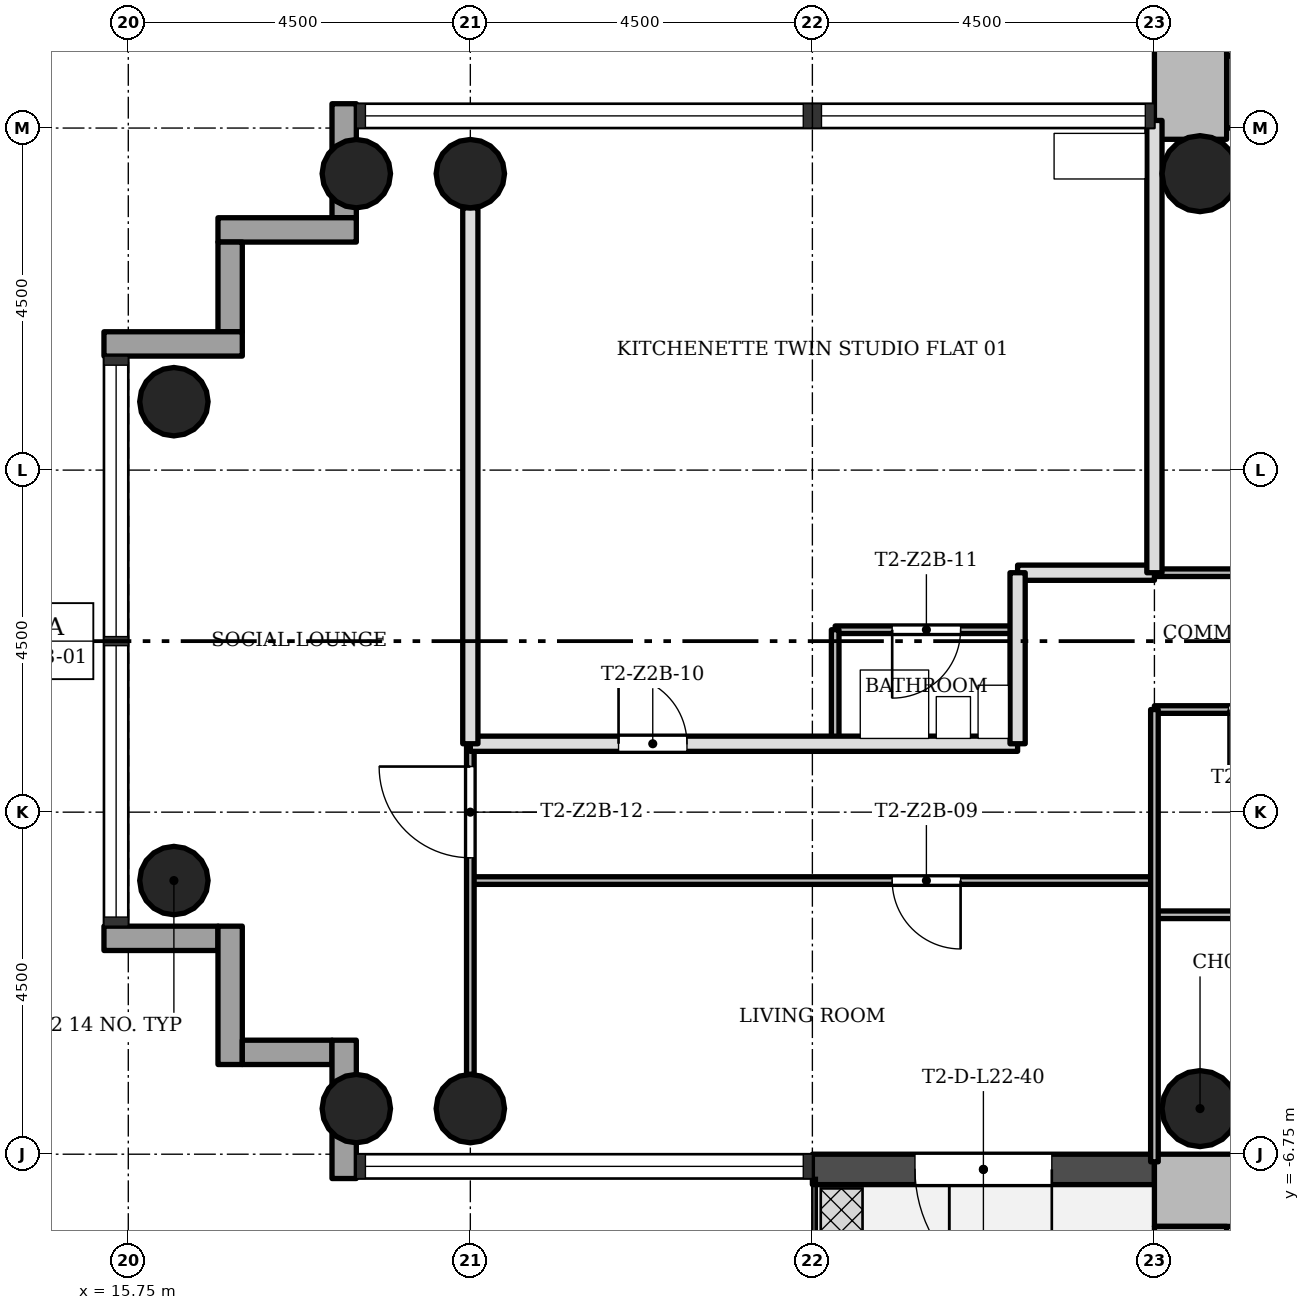
"""IFC4 building model, lengths in metres.
Left out: names, types, materials, properties, quantities, classifications, styles, units other than length and angle.
Written with IfcOpenShell. Run it as: python <this file> out.ifc"""

import sys

from ifc_helpers import new_model, si_unit, direction, frame, frame_2d, origin, origin_2d, place, context, subcontext, project, spatial, rectangle, hollow_circle, extrude, element, fill, save


model = new_model("IFC4")
c1 = context("Model", 3, precision=1e-05, world=origin(), true_north=direction((0.0, 1.0)))
c2 = subcontext(c1, "Body", "Model", "MODEL_VIEW")
j1 = project(units=[si_unit("LENGTHUNIT", "METRE"), si_unit("PLANEANGLEUNIT", "RADIAN")], contexts=[c1])
p1 = place(None, origin())
s1 = spatial("IfcSite", under=j1, at=p1, CompositionType="ELEMENT")
p2 = place(p1, origin())
s2 = spatial("IfcBuilding", under=s1, at=p2, CompositionType="ELEMENT")
p3 = place(p2, frame((0.0, 0.0, 83.4)))
s3 = spatial("IfcBuildingStorey", under=s2, at=p3, CompositionType="ELEMENT", Elevation=83.4)
p4 = place(p3, frame((30.2, 7.225, 0.0), z_axis=(0.0, 0.0, 1.0), x_axis=(1.0, 0.0, 0.0)))
e1 = element("IfcWall", 1, at=p4, inside=s3, PredefinedType="SHEAR", context=c2, shape_type="SweptSolid", body=[
    extrude(rectangle(XDim=12.55, YDim=0.95, at=frame_2d((6.275, 0.0))), origin(), (0.0, 0.0, 1.0), 3.4),
])
p5 = place(p4, frame((4.9, 0.0, 0.0)))
e2 = element("IfcOpeningElement", 2, at=p5, cuts=e1, PredefinedType="OPENING", context=c2, shape_type="SweptSolid", body=[
    extrude(rectangle(XDim=1.8, YDim=2.1, at=frame_2d((0.9, 1.05))), frame((0.0, 0.485, 0.0), z_axis=(0.0, -1.0, 0.0), x_axis=(1.0, 0.0, 0.0)), (0.0, 0.0, 1.0), 0.97),
])
p6 = place(p3, frame((29.725, 15.298, 0.0), z_axis=(0.0, 0.0, 1.0), x_axis=(0.0, -1.0, 0.0)))
e3 = element("IfcWall", 3, at=p6, inside=s3, PredefinedType="SHEAR", context=c2, shape_type="SweptSolid", body=[
    extrude(rectangle(XDim=8.696, YDim=0.95, at=frame_2d((4.348, 0.0))), origin(), (0.0, 0.0, 1.0), 3.4),
])
p7 = place(p3, frame((41.8, -7.225, 0.0), z_axis=(0.0, 0.0, 1.0), x_axis=(-1.0, 0.0, 0.0)))
e4 = element("IfcWall", 4, at=p7, inside=s3, PredefinedType="SHEAR", context=c2, shape_type="SweptSolid", body=[
    extrude(rectangle(XDim=12.55, YDim=0.95, at=frame_2d((6.275, 0.0))), origin(), (0.0, 0.0, 1.0), 3.4),
])
p8 = place(p7, frame((4.9, 0.0, 0.0)))
e5 = element("IfcOpeningElement", 5, at=p8, cuts=e4, PredefinedType="OPENING", context=c2, shape_type="SweptSolid", body=[
    extrude(rectangle(XDim=1.8, YDim=2.1, at=frame_2d((0.9, 1.05))), frame((0.0, 0.485, 0.0), z_axis=(0.0, -1.0, 0.0), x_axis=(1.0, 0.0, 0.0)), (0.0, 0.0, 1.0), 0.97),
])
p9 = place(p3, frame((29.725, -7.7, 0.0), z_axis=(0.0, 0.0, 1.0), x_axis=(0.0, -1.0, 0.0)))
e6 = element("IfcWall", 6, at=p9, inside=s3, PredefinedType="SHEAR", context=c2, shape_type="SweptSolid", body=[
    extrude(rectangle(XDim=8.05, YDim=0.95, at=frame_2d((4.025, 0.0))), origin(), (0.0, 0.0, 1.0), 3.4),
])
for number, where, z_axis, x_axis in (
    (7, (20.25, 6.15, 0.0), (0.0, 0.0, 1.0), (1.0, 0.0, 0.0)),
    (8, (20.25, -6.15, 0.0), (0.0, 0.0, 1.0), (1.0, 0.0, 0.0)),
    (9, (18.75, 6.15, 0.0), (0.0, 0.0, 1.0), (1.0, 0.0, 0.0)),
    (10, (18.75, -6.15, 0.0), (0.0, 0.0, 1.0), (1.0, 0.0, 0.0)),
    (11, (16.35, 3.15, 0.0), (0.0, 0.0, 1.0), (1.0, 0.0, 0.0)),
    (12, (16.35, -3.15, 0.0), (0.0, 0.0, 1.0), (1.0, 0.0, 0.0)),
):
    element("IfcColumn", number, at=place(p3, frame(where, z_axis=z_axis, x_axis=x_axis)), inside=s3, PredefinedType="COLUMN", context=c2, shape_type="SweptSolid", body=[
        extrude(hollow_circle(Radius=0.45, WallThickness=0.032, at=origin_2d()), origin(), (0.0, 0.0, 1.0), 3.4),
    ])
for number, where, z_axis, x_axis in (
    (13, (29.85, 6.15, 0.0), (0.0, 0.0, 1.0), (1.0, 0.0, 0.0)),
    (14, (29.85, -6.15, 0.0), (0.0, 0.0, 1.0), (1.0, 0.0, 0.0)),
):
    element("IfcColumn", number, at=place(p3, frame(where, z_axis=z_axis, x_axis=x_axis)), inside=s3, PredefinedType="COLUMN", context=c2, shape_type="SweptSolid", body=[
        extrude(hollow_circle(Radius=0.5, WallThickness=0.036, at=origin_2d()), origin(), (0.0, 0.0, 1.0), 3.4),
    ])
p10 = place(p3, frame((18.59, 7.07, -0.3), z_axis=(0.0, 0.0, 1.0), x_axis=(0.0, -1.0, 0.0)))
e15 = element("IfcWall", 15, at=p10, inside=s3, PredefinedType="STANDARD", context=c2, shape_type="SweptSolid", body=[
    extrude(rectangle(XDim=1.5, YDim=0.32, at=frame_2d((0.75, 0.0))), origin(), (0.0, 0.0, 1.0), 3.4),
])
p11 = place(p3, frame((18.75, 5.41, -0.3), z_axis=(0.0, 0.0, 1.0), x_axis=(-1.0, 0.0, 0.0)))
e16 = element("IfcWall", 16, at=p11, inside=s3, PredefinedType="STANDARD", context=c2, shape_type="SweptSolid", body=[
    extrude(rectangle(XDim=1.82, YDim=0.32, at=frame_2d((0.91, 0.0))), origin(), (0.0, 0.0, 1.0), 3.4),
])
p12 = place(p3, frame((17.09, 5.25, -0.3), z_axis=(0.0, 0.0, 1.0), x_axis=(0.0, -1.0, 0.0)))
e17 = element("IfcWall", 17, at=p12, inside=s3, PredefinedType="STANDARD", context=c2, shape_type="SweptSolid", body=[
    extrude(rectangle(XDim=1.18, YDim=0.32, at=frame_2d((0.59, 0.0))), origin(), (0.0, 0.0, 1.0), 3.4),
])
p13 = place(p3, frame((17.25, 3.91, -0.3), z_axis=(0.0, 0.0, 1.0), x_axis=(-1.0, 0.0, 0.0)))
e18 = element("IfcWall", 18, at=p13, inside=s3, PredefinedType="STANDARD", context=c2, shape_type="SweptSolid", body=[
    extrude(rectangle(XDim=1.82, YDim=0.32, at=frame_2d((0.91, 0.0))), origin(), (0.0, 0.0, 1.0), 3.4),
])
p14 = place(p3, frame((15.43, -3.91, -0.3), z_axis=(0.0, 0.0, 1.0), x_axis=(1.0, 0.0, 0.0)))
e19 = element("IfcWall", 19, at=p14, inside=s3, PredefinedType="STANDARD", context=c2, shape_type="SweptSolid", body=[
    extrude(rectangle(XDim=1.5, YDim=0.32, at=frame_2d((0.75, 0.0))), origin(), (0.0, 0.0, 1.0), 3.4),
])
p15 = place(p3, frame((17.09, -3.75, -0.3), z_axis=(0.0, 0.0, 1.0), x_axis=(0.0, -1.0, 0.0)))
e20 = element("IfcWall", 20, at=p15, inside=s3, PredefinedType="STANDARD", context=c2, shape_type="SweptSolid", body=[
    extrude(rectangle(XDim=1.82, YDim=0.32, at=frame_2d((0.91, 0.0))), origin(), (0.0, 0.0, 1.0), 3.4),
])
p16 = place(p3, frame((17.25, -5.41, -0.3), z_axis=(0.0, 0.0, 1.0), x_axis=(1.0, 0.0, 0.0)))
e21 = element("IfcWall", 21, at=p16, inside=s3, PredefinedType="STANDARD", context=c2, shape_type="SweptSolid", body=[
    extrude(rectangle(XDim=1.18, YDim=0.32, at=frame_2d((0.59, 0.0))), origin(), (0.0, 0.0, 1.0), 3.4),
])
p17 = place(p3, frame((18.59, -5.25, -0.3), z_axis=(0.0, 0.0, 1.0), x_axis=(0.0, -1.0, 0.0)))
e22 = element("IfcWall", 22, at=p17, inside=s3, PredefinedType="STANDARD", context=c2, shape_type="SweptSolid", body=[
    extrude(rectangle(XDim=1.82, YDim=0.32, at=frame_2d((0.91, 0.0))), origin(), (0.0, 0.0, 1.0), 3.4),
])
p18 = place(p3, frame((24.75, -6.95, -0.02), z_axis=(0.0, 0.0, 1.0), x_axis=(1.0, 0.0, 0.0)))
e23 = element("IfcWall", 23, at=p18, inside=s3, PredefinedType="STANDARD", context=c2, shape_type="SweptSolid", body=[
    extrude(rectangle(XDim=4.5, YDim=0.4, at=frame_2d((2.25, 0.0))), origin(), (0.0, 0.0, 1.0), 3.12),
])
p19 = place(p18, frame((1.35, 0.0, 0.02)))
e24 = element("IfcOpeningElement", 24, at=p19, cuts=e23, PredefinedType="OPENING", context=c2, shape_type="SweptSolid", body=[
    extrude(rectangle(XDim=1.8, YDim=2.1, at=frame_2d((0.9, 1.05))), frame((0.0, 0.21, 0.0), z_axis=(0.0, -1.0, 0.0), x_axis=(1.0, 0.0, 0.0)), (0.0, 0.0, 1.0), 0.42),
])
p20 = place(p3, frame((34.5, -3.6, 0.0), z_axis=(0.0, 0.0, 1.0), x_axis=(-1.0, 0.0, 0.0)))
e25 = element("IfcWall", 25, at=p20, inside=s3, PredefinedType="PARTITIONING", context=c2, shape_type="SweptSolid", body=[
    extrude(rectangle(XDim=5.25, YDim=0.1, at=frame_2d((2.625, 0.0))), origin(), (0.0, 0.0, 1.0), 3.0),
])
p21 = place(p3, frame((29.25, -3.15, 0.0), z_axis=(0.0, 0.0, 1.0), x_axis=(-1.0, 0.0, 0.0)))
e26 = element("IfcWall", 26, at=p21, inside=s3, PredefinedType="PARTITIONING", context=c2, shape_type="SweptSolid", body=[
    extrude(rectangle(XDim=9.0, YDim=0.1, at=frame_2d((4.5, 0.0))), origin(), (0.0, 0.0, 1.0), 3.0),
])
p22 = place(p21, frame((2.55, 0.0, 0.0)))
e27 = element("IfcOpeningElement", 27, at=p22, cuts=e26, PredefinedType="OPENING", context=c2, shape_type="SweptSolid", body=[
    extrude(rectangle(XDim=0.9, YDim=2.1, at=frame_2d((0.45, 1.05))), frame((0.0, 0.06, 0.0), z_axis=(0.0, -1.0, 0.0), x_axis=(1.0, 0.0, 0.0)), (0.0, 0.0, 1.0), 0.12),
])
p23 = place(p3, frame((27.45, -1.35, 0.0), z_axis=(0.0, 0.0, 1.0), x_axis=(-1.0, 0.0, 0.0)))
e28 = element("IfcWall", 28, at=p23, inside=s3, PredefinedType="SOLIDWALL", context=c2, shape_type="SweptSolid", body=[
    extrude(rectangle(XDim=7.2, YDim=0.2, at=frame_2d((3.6, 0.0))), origin(), (0.0, 0.0, 1.0), 3.0),
])
p24 = place(p23, frame((4.35, 0.0, 0.0)))
e29 = element("IfcOpeningElement", 29, at=p24, cuts=e28, PredefinedType="OPENING", context=c2, shape_type="SweptSolid", body=[
    extrude(rectangle(XDim=0.9, YDim=2.1, at=frame_2d((0.45, 1.05))), frame((0.0, 0.11, 0.0), z_axis=(0.0, -1.0, 0.0), x_axis=(1.0, 0.0, 0.0)), (0.0, 0.0, 1.0), 0.22),
])
p25 = place(p3, frame((34.5, -0.9, 0.0), z_axis=(0.0, 0.0, 1.0), x_axis=(-1.0, 0.0, 0.0)))
e30 = element("IfcWall", 30, at=p25, inside=s3, PredefinedType="PARTITIONING", context=c2, shape_type="SweptSolid", body=[
    extrude(rectangle(XDim=5.25, YDim=0.1, at=frame_2d((2.625, 0.0))), origin(), (0.0, 0.0, 1.0), 3.0),
])
p26 = place(p25, frame((0.75, 0.0, 0.0)))
e31 = element("IfcOpeningElement", 31, at=p26, cuts=e30, PredefinedType="OPENING", context=c2, shape_type="SweptSolid", body=[
    extrude(rectangle(XDim=0.9, YDim=2.1, at=frame_2d((0.45, 1.05))), frame((0.0, 0.06, 0.0), z_axis=(0.0, -1.0, 0.0), x_axis=(1.0, 0.0, 0.0)), (0.0, 0.0, 1.0), 0.12),
])
p27 = place(p25, frame((3.375, 0.0, 0.0)))
e32 = element("IfcOpeningElement", 32, at=p27, cuts=e30, PredefinedType="OPENING", context=c2, shape_type="SweptSolid", body=[
    extrude(rectangle(XDim=0.9, YDim=2.1, at=frame_2d((0.45, 1.05))), frame((0.0, 0.06, 0.0), z_axis=(0.0, -1.0, 0.0), x_axis=(1.0, 0.0, 0.0)), (0.0, 0.0, 1.0), 0.12),
])
p28 = place(p3, frame((27.45, 0.15, 0.0), z_axis=(0.0, 0.0, 1.0), x_axis=(-1.0, 0.0, 0.0)))
e33 = element("IfcWall", 33, at=p28, inside=s3, PredefinedType="PARTITIONING", context=c2, shape_type="SweptSolid", body=[
    extrude(rectangle(XDim=2.4, YDim=0.1, at=frame_2d((1.2, 0.0))), origin(), (0.0, 0.0, 1.0), 3.0),
])
p29 = place(p28, frame((0.75, 0.0, 0.0)))
e34 = element("IfcOpeningElement", 34, at=p29, cuts=e33, PredefinedType="OPENING", context=c2, shape_type="SweptSolid", body=[
    extrude(rectangle(XDim=0.9, YDim=2.1, at=frame_2d((0.45, 1.05))), frame((0.0, 0.06, 0.0), z_axis=(0.0, -1.0, 0.0), x_axis=(1.0, 0.0, 0.0)), (0.0, 0.0, 1.0), 0.12),
])
p30 = place(p3, frame((34.5, 0.9, 0.0), z_axis=(0.0, 0.0, 1.0), x_axis=(-1.0, 0.0, 0.0)))
e35 = element("IfcWall", 35, at=p30, inside=s3, PredefinedType="PARTITIONING", context=c2, shape_type="SweptSolid", body=[
    extrude(rectangle(XDim=5.25, YDim=0.1, at=frame_2d((2.625, 0.0))), origin(), (0.0, 0.0, 1.0), 3.0),
])
p31 = place(p3, frame((29.25, 0.9, 0.0), z_axis=(0.0, 0.0, 1.0), x_axis=(-1.0, 0.0, 0.0)))
e36 = element("IfcWall", 36, at=p31, inside=s3, PredefinedType="SOLIDWALL", context=c2, shape_type="SweptSolid", body=[
    extrude(rectangle(XDim=1.8, YDim=0.2, at=frame_2d((0.9, 0.0))), origin(), (0.0, 0.0, 1.0), 3.0),
])
p32 = place(p3, frame((29.25, -6.85, 0.0), z_axis=(0.0, 0.0, 1.0), x_axis=(0.0, 1.0, 0.0)))
e37 = element("IfcWall", 37, at=p32, inside=s3, PredefinedType="PARTITIONING", context=c2, shape_type="SweptSolid", body=[
    extrude(rectangle(XDim=5.95, YDim=0.1, at=frame_2d((2.975, 0.0))), origin(), (0.0, 0.0, 1.0), 3.0),
])
p33 = place(p3, frame((29.25, 0.9, 0.0), z_axis=(0.0, 0.0, 1.0), x_axis=(0.0, 1.0, 0.0)))
e38 = element("IfcWall", 38, at=p33, inside=s3, PredefinedType="SOLIDWALL", context=c2, shape_type="SweptSolid", body=[
    extrude(rectangle(XDim=5.95, YDim=0.2, at=frame_2d((2.975, 0.0))), origin(), (0.0, 0.0, 1.0), 3.0),
])
p34 = place(p3, frame((27.45, -1.35, 0.0), z_axis=(0.0, 0.0, 1.0), x_axis=(0.0, 1.0, 0.0)))
e39 = element("IfcWall", 39, at=p34, inside=s3, PredefinedType="SOLIDWALL", context=c2, shape_type="SweptSolid", body=[
    extrude(rectangle(XDim=2.25, YDim=0.2, at=frame_2d((1.125, 0.0))), origin(), (0.0, 0.0, 1.0), 3.0),
])
p35 = place(p3, frame((25.05, -1.35, 0.0), z_axis=(0.0, 0.0, 1.0), x_axis=(0.0, 1.0, 0.0)))
e40 = element("IfcWall", 40, at=p35, inside=s3, PredefinedType="PARTITIONING", context=c2, shape_type="SweptSolid", body=[
    extrude(rectangle(XDim=1.5, YDim=0.1, at=frame_2d((0.75, 0.0))), origin(), (0.0, 0.0, 1.0), 3.0),
])
p36 = place(p3, frame((20.25, -5.7, 0.0), z_axis=(0.0, 0.0, 1.0), x_axis=(0.0, 1.0, 0.0)))
e41 = element("IfcWall", 41, at=p36, inside=s3, PredefinedType="PARTITIONING", context=c2, shape_type="SweptSolid", body=[
    extrude(rectangle(XDim=4.35, YDim=0.1, at=frame_2d((2.175, 0.0))), origin(), (0.0, 0.0, 1.0), 3.0),
])
p37 = place(p36, frame((2.85, 0.0, 0.0)))
e42 = element("IfcOpeningElement", 42, at=p37, cuts=e41, PredefinedType="OPENING", context=c2, shape_type="SweptSolid", body=[
    extrude(rectangle(XDim=1.2, YDim=2.1, at=frame_2d((0.6, 1.05))), frame((0.0, 0.06, 0.0), z_axis=(0.0, -1.0, 0.0), x_axis=(1.0, 0.0, 0.0)), (0.0, 0.0, 1.0), 0.12),
])
p38 = place(p3, frame((20.25, -1.35, 0.0), z_axis=(0.0, 0.0, 1.0), x_axis=(0.0, 1.0, 0.0)))
e43 = element("IfcWall", 43, at=p38, inside=s3, PredefinedType="SOLIDWALL", context=c2, shape_type="SweptSolid", body=[
    extrude(rectangle(XDim=7.05, YDim=0.2, at=frame_2d((3.525, 0.0))), origin(), (0.0, 0.0, 1.0), 3.0),
])
p39 = place(p3, frame((34.1, 7.825, 0.0), z_axis=(0.0, 0.0, 1.0), x_axis=(-1.0, 0.0, 0.0)))
e44 = element("IfcWall", 44, at=p39, inside=s3, PredefinedType="SHEAR", context=c2, shape_type="SweptSolid", body=[
    extrude(rectangle(XDim=3.9, YDim=0.25, at=frame_2d((1.95, 0.0))), origin(), (0.0, 0.0, 1.0), 3.4),
])
p40 = place(p19, origin())
e45 = element("IfcDoor", 45, at=p40, inside=s3, OperationType="SINGLE_SWING_RIGHT", PredefinedType="DOOR", context=c2, shape_type="SweptSolid", body=[
    extrude(rectangle(XDim=1.8, YDim=2.1, at=frame_2d((0.9, 1.05))), frame((0.0, 0.025, 0.0), z_axis=(0.0, -1.0, 0.0), x_axis=(1.0, 0.0, 0.0)), (0.0, 0.0, 1.0), 0.05),
])
fill(e24, e45)
p41 = place(p27, origin())
e46 = element("IfcDoor", 46, at=p41, inside=s3, OperationType="SINGLE_SWING_LEFT", PredefinedType="DOOR", context=c2, shape_type="SweptSolid", body=[
    extrude(rectangle(XDim=0.9, YDim=2.1, at=frame_2d((0.45, 1.05))), frame((0.0, 0.025, 0.0), z_axis=(0.0, -1.0, 0.0), x_axis=(1.0, 0.0, 0.0)), (0.0, 0.0, 1.0), 0.05),
])
fill(e32, e46)
p42 = place(p22, origin())
e47 = element("IfcDoor", 47, at=p42, inside=s3, OperationType="SINGLE_SWING_RIGHT", PredefinedType="DOOR", context=c2, shape_type="SweptSolid", body=[
    extrude(rectangle(XDim=0.9, YDim=2.1, at=frame_2d((0.45, 1.05))), frame((0.0, 0.025, 0.0), z_axis=(0.0, -1.0, 0.0), x_axis=(1.0, 0.0, 0.0)), (0.0, 0.0, 1.0), 0.05),
])
fill(e27, e47)
p43 = place(p24, origin())
e48 = element("IfcDoor", 48, at=p43, inside=s3, OperationType="SINGLE_SWING_RIGHT", PredefinedType="DOOR", context=c2, shape_type="SweptSolid", body=[
    extrude(rectangle(XDim=0.9, YDim=2.1, at=frame_2d((0.45, 1.05))), frame((0.0, 0.025, 0.0), z_axis=(0.0, -1.0, 0.0), x_axis=(1.0, 0.0, 0.0)), (0.0, 0.0, 1.0), 0.05),
])
fill(e29, e48)
p44 = place(p29, origin())
e49 = element("IfcDoor", 49, at=p44, inside=s3, OperationType="SINGLE_SWING_LEFT", PredefinedType="DOOR", context=c2, shape_type="SweptSolid", body=[
    extrude(rectangle(XDim=0.9, YDim=2.1, at=frame_2d((0.45, 1.05))), frame((0.0, 0.025, 0.0), z_axis=(0.0, -1.0, 0.0), x_axis=(1.0, 0.0, 0.0)), (0.0, 0.0, 1.0), 0.05),
])
fill(e34, e49)
p45 = place(p37, origin())
e50 = element("IfcDoor", 50, at=p45, inside=s3, OperationType="SINGLE_SWING_LEFT", PredefinedType="DOOR", context=c2, shape_type="SweptSolid", body=[
    extrude(rectangle(XDim=1.2, YDim=2.1, at=frame_2d((0.6, 1.05))), frame((0.0, 0.025, 0.0), z_axis=(0.0, -1.0, 0.0), x_axis=(1.0, 0.0, 0.0)), (0.0, 0.0, 1.0), 0.05),
])
fill(e42, e50)
save(model, sys.argv[1])
